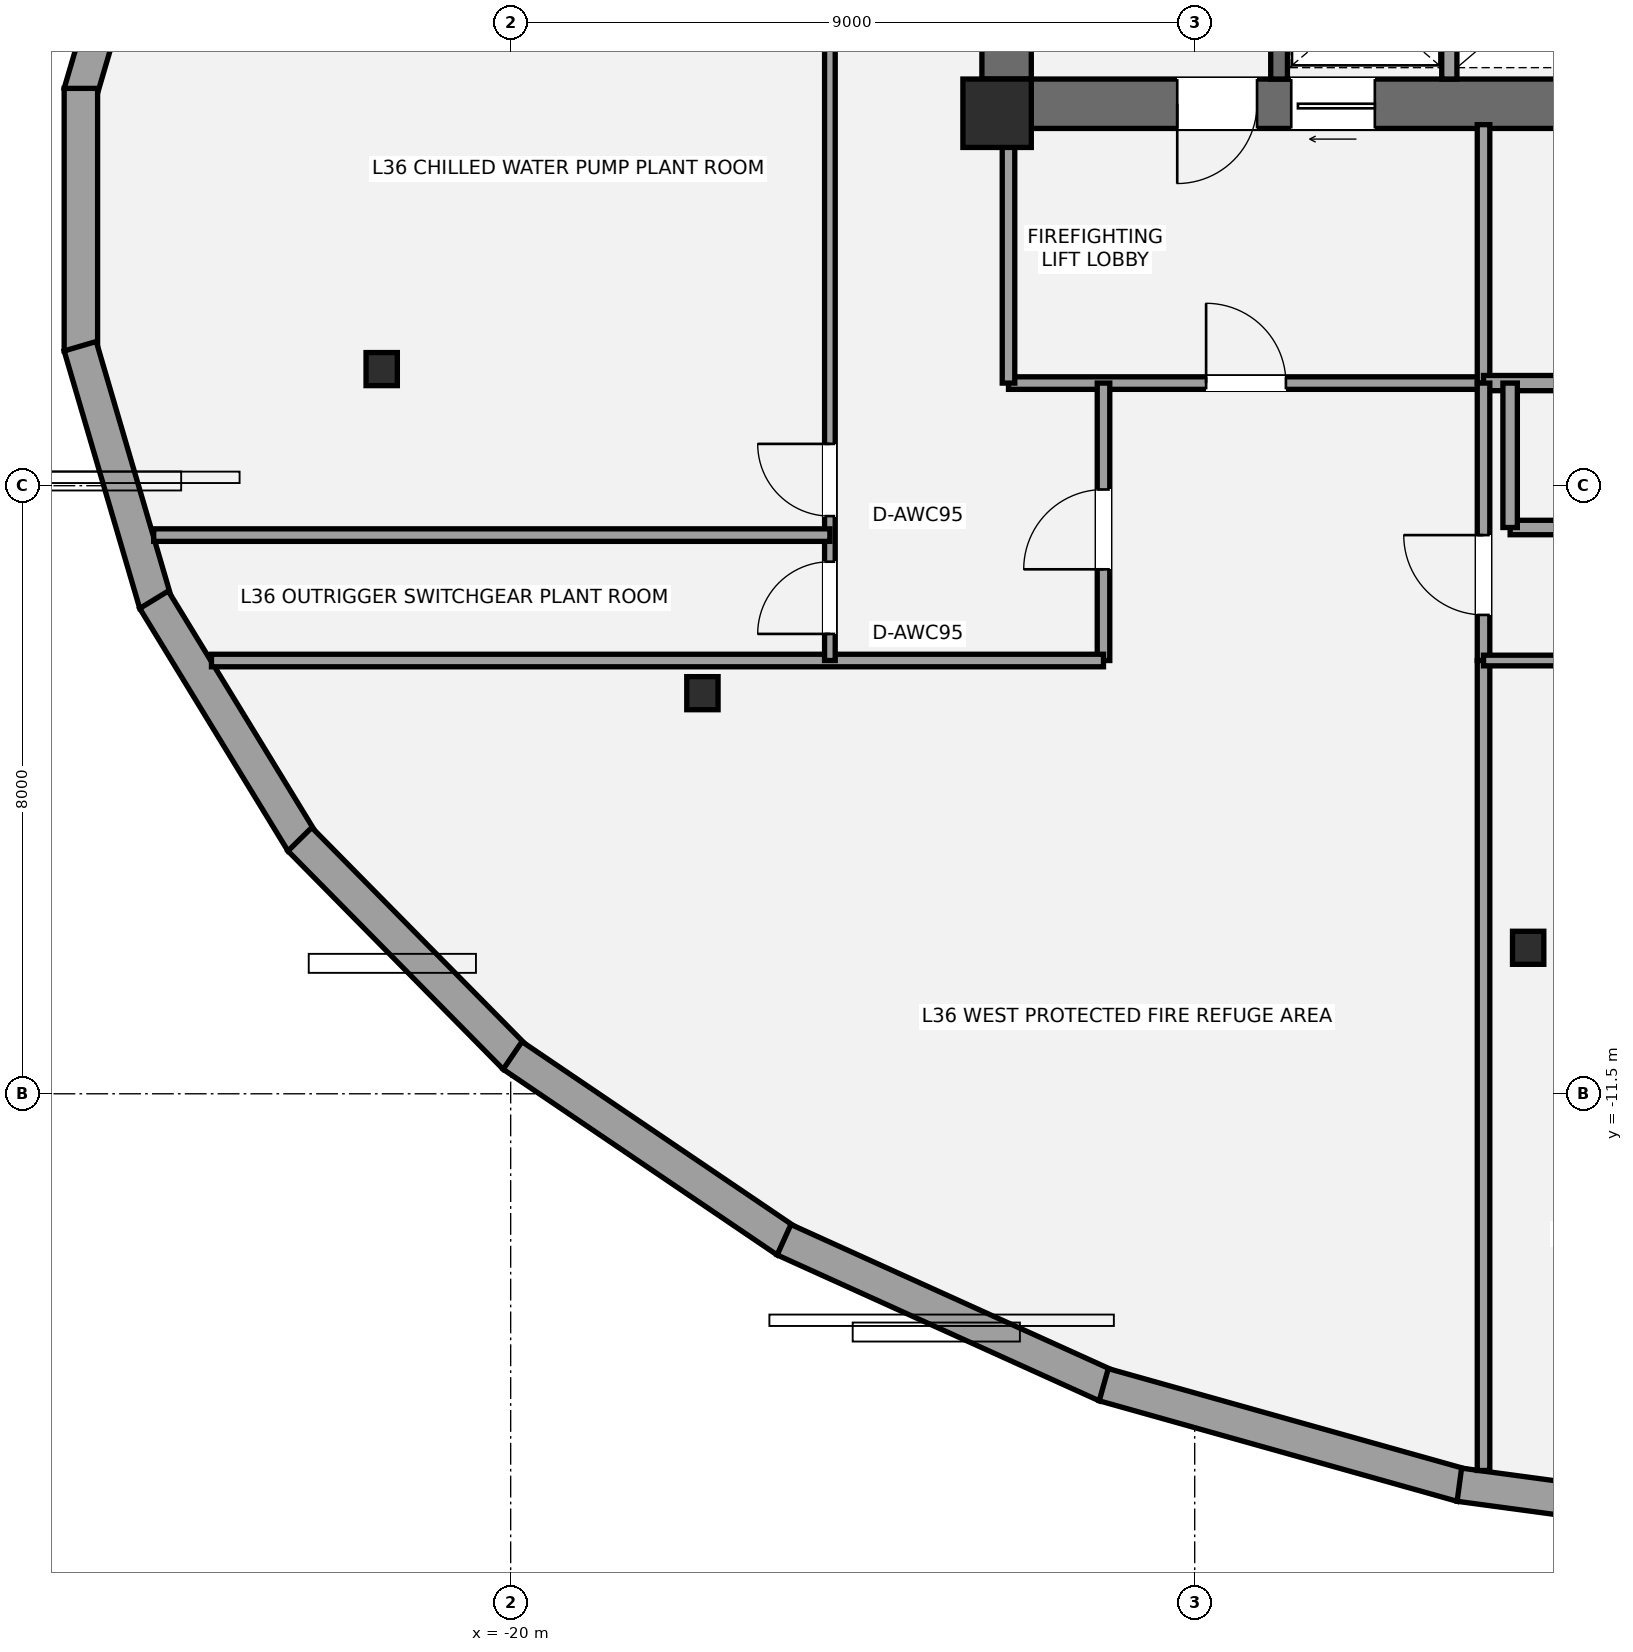
"""IFC4 building model, lengths in metres.
Left out: names, types, materials, properties, quantities, classifications, styles, units other than length and angle.
Written with IfcOpenShell. Run it as: python <this file> out.ifc"""

import sys

from ifc_helpers import new_model, si_unit, direction, frame, frame_2d, origin, origin_2d, place, context, subcontext, project, spatial, rectangle, i_section, extrude, element, fill, save


model = new_model("IFC4")
c1 = context("Model", 3, precision=1e-05, world=origin(), true_north=direction((0.0, 1.0)))
c2 = subcontext(c1, "Body", "Model", "MODEL_VIEW")
j1 = project(units=[si_unit("LENGTHUNIT", "METRE"), si_unit("PLANEANGLEUNIT", "RADIAN")], contexts=[c1])
p1 = place(None, origin())
s1 = spatial("IfcSite", under=j1, at=p1, CompositionType="ELEMENT")
p2 = place(p1, origin())
s2 = spatial("IfcBuilding", under=s1, at=p2, CompositionType="ELEMENT")
p3 = place(p2, frame((0.0, 0.0, 135.1)))
s3 = spatial("IfcBuildingStorey", under=s2, at=p3, CompositionType="ELEMENT", Elevation=135.1)
p4 = place(p3, frame((-13.475, 1.2, 0.0), z_axis=(0.0, 0.0, 1.0), x_axis=(0.0, 1.0, 0.0)))
e1 = element("IfcWall", 1, at=p4, inside=s3, PredefinedType="SHEAR", context=c2, shape_type="SweptSolid", body=[
    extrude(rectangle(XDim=8.45, YDim=0.65, at=frame_2d((4.225, 0.0))), origin(), (0.0, 0.0, 1.0), 4.5),
])
p5 = place(p3, frame((-4.875, 1.525, 0.0), z_axis=(0.0, 0.0, 1.0), x_axis=(-1.0, 0.0, 0.0)))
e2 = element("IfcWall", 2, at=p5, inside=s3, PredefinedType="SHEAR", context=c2, shape_type="SweptSolid", body=[
    extrude(rectangle(XDim=8.925, YDim=0.65, at=frame_2d((4.462, 0.0))), origin(), (0.0, 0.0, 1.0), 4.5),
])
p6 = place(p5, frame((5.305, 0.0, 0.0)))
e3 = element("IfcOpeningElement", 3, at=p6, cuts=e2, PredefinedType="OPENING", context=c2, shape_type="SweptSolid", body=[
    extrude(rectangle(XDim=1.05, YDim=2.15, at=frame_2d((0.525, 1.075))), frame((0.0, 0.335, 0.0), z_axis=(0.0, -1.0, 0.0), x_axis=(1.0, 0.0, 0.0)), (0.0, 0.0, 1.0), 0.67),
])
p7 = place(p5, frame((3.755, 0.0, 0.0)))
e4 = element("IfcOpeningElement", 4, at=p7, cuts=e2, PredefinedType="OPENING", context=c2, shape_type="SweptSolid", body=[
    extrude(rectangle(XDim=1.1, YDim=2.2, at=frame_2d((0.55, 1.1))), frame((0.0, 0.335, 0.0), z_axis=(0.0, -1.0, 0.0), x_axis=(1.0, 0.0, 0.0)), (0.0, 0.0, 1.0), 0.67),
])
p8 = place(p3, frame((-9.89, 1.85, 0.0), z_axis=(0.0, 0.0, 1.0), x_axis=(0.0, 1.0, 0.0)))
e5 = element("IfcWall", 5, at=p8, inside=s3, PredefinedType="SHEAR", context=c2, shape_type="SweptSolid", body=[
    extrude(rectangle(XDim=7.15, YDim=0.22, at=frame_2d((3.575, 0.0))), origin(), (0.0, 0.0, 1.0), 4.5),
])
p9 = place(p3, frame((-13.6, 1.4, 0.0), z_axis=(0.0, 0.0, 1.0), x_axis=(1.0, 0.0, 0.0)))
e6 = element("IfcColumn", 6, at=p9, inside=s3, PredefinedType="COLUMN", context=c2, shape_type="SweptSolid", body=[
    extrude(rectangle(XDim=0.9, YDim=0.9, at=origin_2d()), origin(), (0.0, 0.0, 1.0), 4.5),
])
for number, where, z_axis, x_axis in (
    (7, (-21.697, -1.966, 0.0), (0.0, 0.0, 1.0), (1.0, 0.0, 0.0)),
    (8, (-17.477, -6.229, 0.0), (0.0, 0.0, 1.0), (1.0, 0.0, 0.0)),
    (9, (-6.613, -9.579, 0.0), (0.0, 0.0, 1.0), (1.0, 0.0, 0.0)),
):
    element("IfcColumn", number, at=place(p3, frame(where, z_axis=z_axis, x_axis=x_axis)), inside=s3, PredefinedType="COLUMN", context=c2, shape_type="SweptSolid", body=[
        extrude(i_section(OverallWidth=0.412, OverallDepth=0.435, WebThickness=0.036, FlangeThickness=0.057, at=origin_2d()), origin(), (0.0, 0.0, 1.0), 4.5),
    ])
p10 = place(p3, frame((-25.664, 1.665, 0.0), z_axis=(0.0, 0.0, 1.0), x_axis=(0.28170956188, 0.959499725245, 0.0)))
e10 = element("IfcWall", 10, at=p10, inside=s3, PredefinedType="STANDARD", context=c2, shape_type="SweptSolid", body=[
    extrude(rectangle(XDim=3.531, YDim=0.44, at=frame_2d((1.765, 0.0))), origin(), (0.0, 0.0, 1.0), 3.498),
])
p11 = place(p3, frame((-25.655, -1.727, 0.0), z_axis=(0.0, 0.0, 1.0), x_axis=(0.0, 1.0, 0.0)))
e11 = element("IfcWall", 11, at=p11, inside=s3, PredefinedType="STANDARD", context=c2, shape_type="SweptSolid", body=[
    extrude(rectangle(XDim=3.454, YDim=0.44, at=frame_2d((1.727, 0.0))), origin(), (0.0, 0.0, 1.0), 3.498),
])
p12 = place(p3, frame((-24.669, -5.053, 0.0), z_axis=(0.0, 0.0, 1.0), x_axis=(-0.28170956188, 0.959499725245, 0.0)))
e12 = element("IfcWall", 12, at=p12, inside=s3, PredefinedType="STANDARD", context=c2, shape_type="SweptSolid", body=[
    extrude(rectangle(XDim=3.531, YDim=0.44, at=frame_2d((1.765, 0.0))), origin(), (0.0, 0.0, 1.0), 3.498),
])
p13 = place(p3, frame((-22.742, -8.191, 0.0), z_axis=(0.0, 0.0, 1.0), x_axis=(-0.521476412293, 0.853265698022, 0.0)))
e13 = element("IfcWall", 13, at=p13, inside=s3, PredefinedType="STANDARD", context=c2, shape_type="SweptSolid", body=[
    extrude(rectangle(XDim=3.74, YDim=0.44, at=frame_2d((1.87, 0.0))), origin(), (0.0, 0.0, 1.0), 3.498),
])
p14 = place(p3, frame((-19.942, -11.023, 0.0), z_axis=(0.0, 0.0, 1.0), x_axis=(-0.702094935552, 0.712083352897, 0.0)))
e14 = element("IfcWall", 14, at=p14, inside=s3, PredefinedType="STANDARD", context=c2, shape_type="SweptSolid", body=[
    extrude(rectangle(XDim=4.033, YDim=0.44, at=frame_2d((2.017, 0.0))), origin(), (0.0, 0.0, 1.0), 3.498),
])
p15 = place(p3, frame((-16.371, -13.438, 0.0), z_axis=(0.0, 0.0, 1.0), x_axis=(-0.827816201219, 0.56099940909, 0.0)))
e15 = element("IfcWall", 15, at=p15, inside=s3, PredefinedType="STANDARD", context=c2, shape_type="SweptSolid", body=[
    extrude(rectangle(XDim=4.354, YDim=0.44, at=frame_2d((2.177, 0.0))), origin(), (0.0, 0.0, 1.0), 3.498),
])
p16 = place(p3, frame((-12.166, -15.339, 0.0), z_axis=(0.0, 0.0, 1.0), x_axis=(-0.910938924115, 0.412541242221, 0.0)))
e16 = element("IfcWall", 16, at=p16, inside=s3, PredefinedType="STANDARD", context=c2, shape_type="SweptSolid", body=[
    extrude(rectangle(XDim=4.652, YDim=0.44, at=frame_2d((2.326, 0.0))), origin(), (0.0, 0.0, 1.0), 3.498),
])
p17 = place(p3, frame((-7.488, -16.649, 0.0), z_axis=(0.0, 0.0, 1.0), x_axis=(-0.962790668442, 0.270248272446, 0.0)))
e17 = element("IfcWall", 17, at=p17, inside=s3, PredefinedType="STANDARD", context=c2, shape_type="SweptSolid", body=[
    extrude(rectangle(XDim=4.891, YDim=0.44, at=frame_2d((2.445, 0.0))), origin(), (0.0, 0.0, 1.0), 3.498),
])
p18 = place(p3, frame((-2.519, -17.317, 0.0), z_axis=(0.0, 0.0, 1.0), x_axis=(-0.99103751038, 0.133583880086, 0.0)))
e18 = element("IfcWall", 18, at=p18, inside=s3, PredefinedType="STANDARD", context=c2, shape_type="SweptSolid", body=[
    extrude(rectangle(XDim=5.044, YDim=0.44, at=frame_2d((2.522, 0.0))), origin(), (0.0, 0.0, 1.0), 3.498),
])
p19 = place(p3, frame((-13.45, -2.15, 0.0), z_axis=(0.0, 0.0, 1.0), x_axis=(1.0, 0.0, 0.0)))
e19 = element("IfcWall", 19, at=p19, inside=s3, PredefinedType="PARTITIONING", context=c2, shape_type="SweptSolid", body=[
    extrude(rectangle(XDim=6.25, YDim=0.165, at=frame_2d((3.125, 0.0))), origin(), (0.0, 0.0, 1.0), 4.28),
])
p20 = place(p19, frame((2.6, 0.0, 0.0)))
e20 = element("IfcOpeningElement", 20, at=p20, cuts=e19, PredefinedType="OPENING", context=c2, shape_type="SweptSolid", body=[
    extrude(rectangle(XDim=1.05, YDim=2.15, at=frame_2d((0.525, 1.075))), frame((0.0, 0.093, 0.0), z_axis=(0.0, -1.0, 0.0), x_axis=(1.0, 0.0, 0.0)), (0.0, 0.0, 1.0), 0.185),
])
p21 = place(p3, frame((-13.45, -2.15, 0.0), z_axis=(0.0, 0.0, 1.0), x_axis=(0.0, 1.0, 0.0)))
e21 = element("IfcWall", 21, at=p21, inside=s3, PredefinedType="PARTITIONING", context=c2, shape_type="SweptSolid", body=[
    extrude(rectangle(XDim=3.4, YDim=0.165, at=frame_2d((1.7, 0.0))), origin(), (0.0, 0.0, 1.0), 2.47),
])
p22 = place(p3, frame((-7.2, -2.15, 0.0), z_axis=(0.0, 0.0, 1.0), x_axis=(0.0, 1.0, 0.0)))
e22 = element("IfcWall", 22, at=p22, inside=s3, PredefinedType="PARTITIONING", context=c2, shape_type="SweptSolid", body=[
    extrude(rectangle(XDim=3.4, YDim=0.165, at=frame_2d((1.7, 0.0))), origin(), (0.0, 0.0, 1.0), 3.733),
])
p23 = place(p3, frame((-7.2, -2.15, 0.0), z_axis=(0.0, 0.0, 1.0), x_axis=(1.0, 0.0, 0.0)))
e23 = element("IfcWall", 23, at=p23, inside=s3, PredefinedType="SOLIDWALL", context=c2, shape_type="SweptSolid", body=[
    extrude(rectangle(XDim=2.25, YDim=0.2, at=frame_2d((1.125, 0.0))), origin(), (0.0, 0.0, 1.0), 2.47),
])
p24 = place(p3, frame((-7.65, 1.85, 0.0), z_axis=(0.0, 0.0, 1.0), x_axis=(0.0, 1.0, 0.0)))
e24 = element("IfcWall", 24, at=p24, inside=s3, PredefinedType="SOLIDWALL", context=c2, shape_type="SweptSolid", body=[
    extrude(rectangle(XDim=1.93, YDim=0.2, at=frame_2d((0.965, 0.0))), origin(), (0.0, 0.0, 1.0), 4.28),
])
p25 = place(p3, frame((-6.85, -4.05, 0.0), z_axis=(0.0, 0.0, 1.0), x_axis=(1.0, 0.0, 0.0)))
e25 = element("IfcWall", 25, at=p25, inside=s3, PredefinedType="PLUMBINGWALL", context=c2, shape_type="SweptSolid", body=[
    extrude(rectangle(XDim=4.75, YDim=0.19, at=frame_2d((2.375, 0.0))), origin(), (0.0, 0.0, 1.0), 2.47),
])
p26 = place(p25, frame((1.8, 0.0, 0.0)))
e26 = element("IfcOpeningElement", 26, at=p26, cuts=e25, PredefinedType="OPENING", context=c2, shape_type="SweptSolid", body=[
    extrude(rectangle(XDim=0.9, YDim=2.1, at=frame_2d((0.45, 1.05))), frame((0.0, 0.105, 0.0), z_axis=(0.0, -1.0, 0.0), x_axis=(1.0, 0.0, 0.0)), (0.0, 0.0, 1.0), 0.21),
])
p27 = place(p3, frame((-6.85, -4.05, 0.0), z_axis=(0.0, 0.0, 1.0), x_axis=(0.0, 1.0, 0.0)))
e27 = element("IfcWall", 27, at=p27, inside=s3, PredefinedType="PLUMBINGWALL", context=c2, shape_type="SweptSolid", body=[
    extrude(rectangle(XDim=1.9, YDim=0.19, at=frame_2d((0.95, 0.0))), origin(), (0.0, 0.0, 1.0), 4.28),
])
p28 = place(p3, frame((-12.2, -5.8, 0.0), z_axis=(0.0, 0.0, 1.0), x_axis=(0.0, 1.0, 0.0)))
e28 = element("IfcWall", 28, at=p28, inside=s3, PredefinedType="PARTITIONING", context=c2, shape_type="SweptSolid", body=[
    extrude(rectangle(XDim=3.65, YDim=0.165, at=frame_2d((1.825, 0.0))), origin(), (0.0, 0.0, 1.0), 4.28),
])
p29 = place(p28, frame((1.2, 0.0, 0.0)))
e29 = element("IfcOpeningElement", 29, at=p29, cuts=e28, PredefinedType="OPENING", context=c2, shape_type="SweptSolid", body=[
    extrude(rectangle(XDim=1.05, YDim=2.15, at=frame_2d((0.525, 1.075))), frame((0.0, 0.093, 0.0), z_axis=(0.0, -1.0, 0.0), x_axis=(1.0, 0.0, 0.0)), (0.0, 0.0, 1.0), 0.185),
])
p30 = place(p3, frame((-7.2, -5.8, 0.0), z_axis=(0.0, 0.0, 1.0), x_axis=(0.0, 1.0, 0.0)))
e30 = element("IfcWall", 30, at=p30, inside=s3, PredefinedType="PARTITIONING", context=c2, shape_type="SweptSolid", body=[
    extrude(rectangle(XDim=3.65, YDim=0.165, at=frame_2d((1.825, 0.0))), origin(), (0.0, 0.0, 1.0), 3.733),
])
p31 = place(p30, frame((0.6, 0.0, 0.0)))
e31 = element("IfcOpeningElement", 31, at=p31, cuts=e30, PredefinedType="OPENING", context=c2, shape_type="SweptSolid", body=[
    extrude(rectangle(XDim=1.05, YDim=2.15, at=frame_2d((0.525, 1.075))), frame((0.0, 0.093, 0.0), z_axis=(0.0, -1.0, 0.0), x_axis=(1.0, 0.0, 0.0)), (0.0, 0.0, 1.0), 0.185),
])
p32 = place(p3, frame((-7.2, -16.456, 0.0), z_axis=(0.0, 0.0, 1.0), x_axis=(0.0, 1.0, 0.0)))
e32 = element("IfcWall", 32, at=p32, inside=s3, PredefinedType="PARTITIONING", context=c2, shape_type="SweptSolid", body=[
    extrude(rectangle(XDim=10.656, YDim=0.165, at=frame_2d((5.328, 0.0))), origin(), (0.0, 0.0, 1.0), 3.733),
])
p33 = place(p3, frame((-23.937, -5.8, 0.0), z_axis=(0.0, 0.0, 1.0), x_axis=(1.0, 0.0, 0.0)))
e33 = element("IfcWall", 33, at=p33, inside=s3, PredefinedType="PARTITIONING", context=c2, shape_type="SweptSolid", body=[
    extrude(rectangle(XDim=11.737, YDim=0.165, at=frame_2d((5.868, 0.0))), origin(), (0.0, 0.0, 1.0), 2.47),
])
p34 = place(p3, frame((-7.2, -5.8, 0.0), z_axis=(0.0, 0.0, 1.0), x_axis=(1.0, 0.0, 0.0)))
e34 = element("IfcWall", 34, at=p34, inside=s3, PredefinedType="PARTITIONING", context=c2, shape_type="SweptSolid", body=[
    extrude(rectangle(XDim=14.4, YDim=0.14, at=frame_2d((7.2, 0.0))), origin(), (0.0, 0.0, 1.0), 2.47),
])
p35 = place(p34, frame((1.8, 0.0, 0.0)))
e35 = element("IfcOpeningElement", 35, at=p35, cuts=e34, PredefinedType="OPENING", context=c2, shape_type="SweptSolid", body=[
    extrude(rectangle(XDim=0.95, YDim=2.15, at=frame_2d((0.475, 1.075))), frame((0.0, 0.08, 0.0), z_axis=(0.0, -1.0, 0.0), x_axis=(1.0, 0.0, 0.0)), (0.0, 0.0, 1.0), 0.16),
])
p36 = place(p34, frame((9.0, 0.0, 0.0)))
e36 = element("IfcOpeningElement", 36, at=p36, cuts=e34, PredefinedType="OPENING", context=c2, shape_type="SweptSolid", body=[
    extrude(rectangle(XDim=0.95, YDim=2.15, at=frame_2d((0.475, 1.075))), frame((0.0, 0.08, 0.0), z_axis=(0.0, -1.0, 0.0), x_axis=(1.0, 0.0, 0.0)), (0.0, 0.0, 1.0), 0.16),
])
p37 = place(p3, frame((-15.8, -5.8, 0.0), z_axis=(0.0, 0.0, 1.0), x_axis=(0.0, 1.0, 0.0)))
e37 = element("IfcWall", 37, at=p37, inside=s3, PredefinedType="PARTITIONING", context=c2, shape_type="SweptSolid", body=[
    extrude(rectangle(XDim=11.2, YDim=0.14, at=frame_2d((5.6, 0.0))), origin(), (0.0, 0.0, 1.0), 2.47),
])
p38 = place(p37, frame((0.35, 0.0, 0.0)))
e38 = element("IfcOpeningElement", 38, at=p38, cuts=e37, PredefinedType="OPENING", context=c2, shape_type="SweptSolid", body=[
    extrude(rectangle(XDim=0.95, YDim=2.15, at=frame_2d((0.475, 1.075))), frame((0.0, 0.08, 0.0), z_axis=(0.0, -1.0, 0.0), x_axis=(1.0, 0.0, 0.0)), (0.0, 0.0, 1.0), 0.16),
])
p39 = place(p37, frame((1.9, 0.0, 0.0)))
e39 = element("IfcOpeningElement", 39, at=p39, cuts=e37, PredefinedType="OPENING", context=c2, shape_type="SweptSolid", body=[
    extrude(rectangle(XDim=0.95, YDim=2.15, at=frame_2d((0.475, 1.075))), frame((0.0, 0.08, 0.0), z_axis=(0.0, -1.0, 0.0), x_axis=(1.0, 0.0, 0.0)), (0.0, 0.0, 1.0), 0.16),
])
p40 = place(p3, frame((-24.697, -4.15, 0.0), z_axis=(0.0, 0.0, 1.0), x_axis=(1.0, 0.0, 0.0)))
e40 = element("IfcWall", 40, at=p40, inside=s3, PredefinedType="PARTITIONING", context=c2, shape_type="SweptSolid", body=[
    extrude(rectangle(XDim=8.897, YDim=0.165, at=frame_2d((4.448, 0.0))), origin(), (0.0, 0.0, 1.0), 2.47),
])
p41 = place(p6, origin())
e41 = element("IfcDoor", 41, at=p41, inside=s3, OperationType="SINGLE_SWING_RIGHT", PredefinedType="DOOR", context=c2, shape_type="SweptSolid", body=[
    extrude(rectangle(XDim=1.05, YDim=2.15, at=frame_2d((0.525, 1.075))), frame((0.0, 0.025, 0.0), z_axis=(0.0, -1.0, 0.0), x_axis=(1.0, 0.0, 0.0)), (0.0, 0.0, 1.0), 0.05),
])
fill(e3, e41)
p42 = place(p7, origin())
e42 = element("IfcDoor", 42, at=p42, inside=s3, OperationType="SLIDING_TO_LEFT", PredefinedType="DOOR", context=c2, shape_type="SweptSolid", body=[
    extrude(rectangle(XDim=1.1, YDim=2.2, at=frame_2d((0.55, 1.1))), frame((0.0, 0.025, 0.0), z_axis=(0.0, -1.0, 0.0), x_axis=(1.0, 0.0, 0.0)), (0.0, 0.0, 1.0), 0.05),
])
fill(e4, e42)
p43 = place(p20, origin())
e43 = element("IfcDoor", 43, at=p43, inside=s3, OperationType="SINGLE_SWING_LEFT", PredefinedType="DOOR", context=c2, shape_type="SweptSolid", body=[
    extrude(rectangle(XDim=1.05, YDim=2.15, at=frame_2d((0.525, 1.075))), frame((0.0, 0.025, 0.0), z_axis=(0.0, -1.0, 0.0), x_axis=(1.0, 0.0, 0.0)), (0.0, 0.0, 1.0), 0.05),
])
fill(e20, e43)
p44 = place(p29, origin())
e44 = element("IfcDoor", 44, at=p44, inside=s3, OperationType="SINGLE_SWING_LEFT", PredefinedType="DOOR", context=c2, shape_type="SweptSolid", body=[
    extrude(rectangle(XDim=1.05, YDim=2.15, at=frame_2d((0.525, 1.075))), frame((0.0, 0.025, 0.0), z_axis=(0.0, -1.0, 0.0), x_axis=(1.0, 0.0, 0.0)), (0.0, 0.0, 1.0), 0.05),
])
fill(e29, e44)
p45 = place(p31, origin())
e45 = element("IfcDoor", 45, at=p45, inside=s3, OperationType="SINGLE_SWING_RIGHT", PredefinedType="DOOR", context=c2, shape_type="SweptSolid", body=[
    extrude(rectangle(XDim=1.05, YDim=2.15, at=frame_2d((0.525, 1.075))), frame((0.0, 0.025, 0.0), z_axis=(0.0, -1.0, 0.0), x_axis=(1.0, 0.0, 0.0)), (0.0, 0.0, 1.0), 0.05),
])
fill(e31, e45)
p46 = place(p38, origin())
e46 = element("IfcDoor", 46, at=p46, inside=s3, OperationType="SINGLE_SWING_LEFT", PredefinedType="DOOR", context=c2, shape_type="SweptSolid", body=[
    extrude(rectangle(XDim=0.95, YDim=2.15, at=frame_2d((0.475, 1.075))), frame((0.0, 0.025, 0.0), z_axis=(0.0, -1.0, 0.0), x_axis=(1.0, 0.0, 0.0)), (0.0, 0.0, 1.0), 0.05),
])
fill(e38, e46)
p47 = place(p39, origin())
e47 = element("IfcDoor", 47, at=p47, inside=s3, OperationType="SINGLE_SWING_RIGHT", PredefinedType="DOOR", context=c2, shape_type="SweptSolid", body=[
    extrude(rectangle(XDim=0.95, YDim=2.15, at=frame_2d((0.475, 1.075))), frame((0.0, 0.025, 0.0), z_axis=(0.0, -1.0, 0.0), x_axis=(1.0, 0.0, 0.0)), (0.0, 0.0, 1.0), 0.05),
])
fill(e39, e47)
save(model, sys.argv[1])
